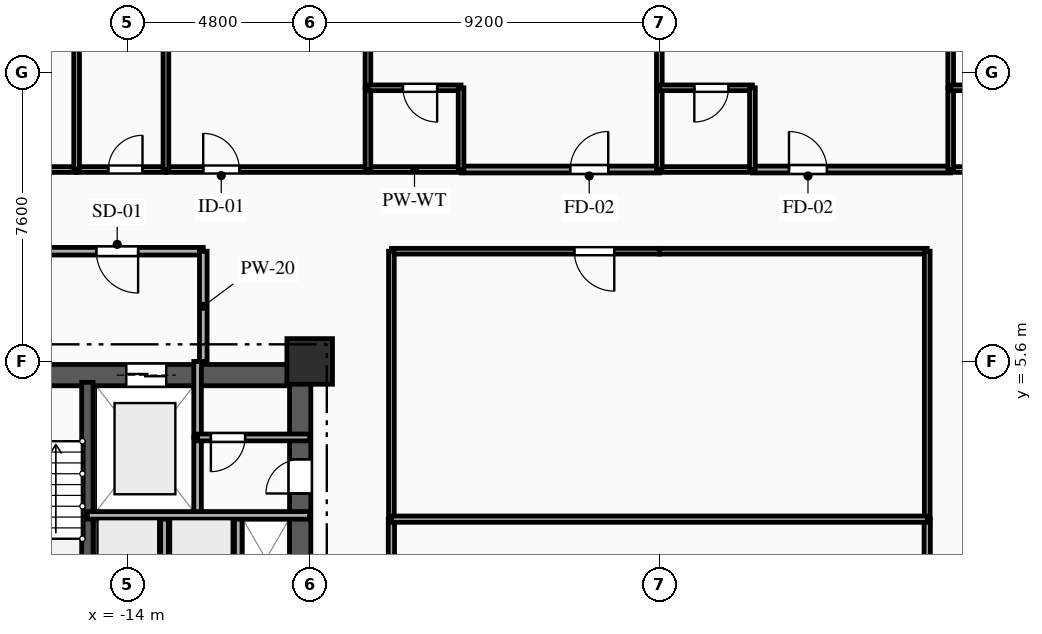
"""IFC4 building model, lengths in metres.
Left out: names, types, materials, properties, quantities, classifications, styles, units other than length and angle.
Written with IfcOpenShell. Run it as: python <this file> out.ifc"""

import sys

from ifc_helpers import new_model, si_unit, direction, frame, frame_2d, origin, origin_2d, place, context, subcontext, project, spatial, rectangle, extrude, element, fill, save


model = new_model("IFC4")
c1 = context("Model", 3, precision=1e-05, world=origin(), true_north=direction((0.0, 1.0)))
c2 = subcontext(c1, "Body", "Model", "MODEL_VIEW")
j1 = project(units=[si_unit("LENGTHUNIT", "METRE"), si_unit("PLANEANGLEUNIT", "RADIAN")], contexts=[c1])
p1 = place(None, origin())
s1 = spatial("IfcSite", under=j1, at=p1, CompositionType="ELEMENT")
p2 = place(p1, origin())
s2 = spatial("IfcBuilding", under=s1, at=p2, CompositionType="ELEMENT")
p3 = place(p2, frame((0.0, 0.0, 43.75)))
s3 = spatial("IfcBuildingStorey", under=s2, at=p3, CompositionType="ELEMENT", Elevation=43.75)
p4 = place(p3, frame((-9.2, 5.6, 0.0), z_axis=(0.0, 0.0, 1.0), x_axis=(1.0, 0.0, 0.0)))
e1 = element("IfcColumn", 1, at=p4, inside=s3, PredefinedType="COLUMN", context=c2, shape_type="SweptSolid", body=[
    extrude(rectangle(XDim=1.2, YDim=1.2, at=origin_2d()), origin(), (0.0, 0.0, 1.0), 3.35),
])
p5 = place(p3, frame((-18.8, 5.24, 0.0), z_axis=(0.0, 0.0, 1.0), x_axis=(1.0, 0.0, 0.0)))
e2 = element("IfcWall", 2, at=p5, inside=s3, PredefinedType="SHEAR", context=c2, shape_type="SweptSolid", body=[
    extrude(rectangle(XDim=9.6, YDim=0.56, at=frame_2d((4.8, 0.0))), origin(), (0.0, 0.0, 1.0), 3.035),
])
p6 = place(p5, frame((1.55, 0.0, 0.0)))
e3 = element("IfcOpeningElement", 3, at=p6, cuts=e2, PredefinedType="OPENING", context=c2, shape_type="SweptSolid", body=[
    extrude(rectangle(XDim=1.1, YDim=2.15, at=frame_2d((0.55, 1.075))), frame((0.0, 0.29, 0.0), z_axis=(0.0, -1.0, 0.0), x_axis=(1.0, 0.0, 0.0)), (0.0, 0.0, 1.0), 0.58),
])
p7 = place(p5, frame((4.775, 0.0, 0.0)))
e4 = element("IfcOpeningElement", 4, at=p7, cuts=e2, PredefinedType="OPENING", context=c2, shape_type="SweptSolid", body=[
    extrude(rectangle(XDim=1.05, YDim=2.1, at=frame_2d((0.525, 1.05))), frame((0.0, 0.29, 0.0), z_axis=(0.0, -1.0, 0.0), x_axis=(1.0, 0.0, 0.0)), (0.0, 0.0, 1.0), 0.58),
])
p8 = place(p3, frame((-9.45, -5.05, 0.0), z_axis=(0.0, 0.0, 1.0), x_axis=(0.0, 1.0, 0.0)))
e5 = element("IfcWall", 5, at=p8, inside=s3, PredefinedType="SHEAR", context=c2, shape_type="SweptSolid", body=[
    extrude(rectangle(XDim=10.1, YDim=0.56, at=frame_2d((5.05, 0.0))), origin(), (0.0, 0.0, 1.0), 3.035),
])
p9 = place(p8, frame((7.175, 0.0, 0.0)))
e6 = element("IfcOpeningElement", 6, at=p9, cuts=e5, PredefinedType="OPENING", context=c2, shape_type="SweptSolid", body=[
    extrude(rectangle(XDim=0.9, YDim=2.1, at=frame_2d((0.45, 1.05))), frame((0.0, 0.29, 0.0), z_axis=(0.0, -1.0, 0.0), x_axis=(1.0, 0.0, 0.0)), (0.0, 0.0, 1.0), 0.58),
])
p10 = place(p8, frame((2.4, 0.0, 0.0)))
e7 = element("IfcOpeningElement", 7, at=p10, cuts=e5, PredefinedType="OPENING", context=c2, shape_type="SweptSolid", body=[
    extrude(rectangle(XDim=1.2, YDim=2.15, at=frame_2d((0.6, 1.075))), frame((0.0, 0.29, 0.0), z_axis=(0.0, -1.0, 0.0), x_axis=(1.0, 0.0, 0.0)), (0.0, 0.0, 1.0), 0.58),
])
p11 = place(p3, frame((-15.05, -5.05, 0.0), z_axis=(0.0, 0.0, 1.0), x_axis=(0.0, 1.0, 0.0)))
e8 = element("IfcWall", 8, at=p11, inside=s3, PredefinedType="SHEAR", context=c2, shape_type="SweptSolid", body=[
    extrude(rectangle(XDim=10.1, YDim=0.3, at=frame_2d((5.05, 0.0))), origin(), (0.0, 0.0, 1.0), 3.035),
])
p12 = place(p3, frame((-12.15, 1.55, 0.0), z_axis=(0.0, 0.0, 1.0), x_axis=(0.0, 1.0, 0.0)))
e9 = element("IfcWall", 9, at=p12, inside=s3, PredefinedType="PARTITIONING", context=c2, shape_type="SweptSolid", body=[
    extrude(rectangle(XDim=2.05, YDim=0.2, at=frame_2d((1.025, 0.0))), origin(), (0.0, 0.0, 1.0), 3.035),
])
p13 = place(p3, frame((-12.15, 3.6, 0.0), z_axis=(0.0, 0.0, 1.0), x_axis=(0.0, 1.0, 0.0)))
e10 = element("IfcWall", 10, at=p13, inside=s3, PredefinedType="PARTITIONING", context=c2, shape_type="SweptSolid", body=[
    extrude(rectangle(XDim=2.0, YDim=0.2, at=frame_2d((1.0, 0.0))), origin(), (0.0, 0.0, 1.0), 3.035),
])
p14 = place(p3, frame((-12.0, 8.5, 0.0), z_axis=(0.0, 0.0, 1.0), x_axis=(-1.0, 0.0, 0.0)))
e11 = element("IfcWall", 11, at=p14, inside=s3, PredefinedType="PARTITIONING", context=c2, shape_type="SweptSolid", body=[
    extrude(rectangle(XDim=6.8, YDim=0.2, at=frame_2d((3.4, 0.0))), origin(), (0.0, 0.0, 1.0), 3.035),
])
p15 = place(p14, frame((1.715, 0.0, 0.0)))
e12 = element("IfcOpeningElement", 12, at=p15, cuts=e11, PredefinedType="OPENING", context=c2, shape_type="SweptSolid", body=[
    extrude(rectangle(XDim=1.1, YDim=2.15, at=frame_2d((0.55, 1.075))), frame((0.0, 0.11, 0.0), z_axis=(0.0, -1.0, 0.0), x_axis=(1.0, 0.0, 0.0)), (0.0, 0.0, 1.0), 0.22),
])
p16 = place(p3, frame((-12.0, 5.6, 0.0), z_axis=(0.0, 0.0, 1.0), x_axis=(0.0, 1.0, 0.0)))
e13 = element("IfcWall", 13, at=p16, inside=s3, PredefinedType="PARTITIONING", context=c2, shape_type="SweptSolid", body=[
    extrude(rectangle(XDim=2.9, YDim=0.2, at=frame_2d((1.45, 0.0))), origin(), (0.0, 0.0, 1.0), 3.035),
])
p17 = place(p3, frame((-9.2, 3.6, 0.0), z_axis=(0.0, 0.0, 1.0), x_axis=(-1.0, 0.0, 0.0)))
e14 = element("IfcWall", 14, at=p17, inside=s3, PredefinedType="PARTITIONING", context=c2, shape_type="SweptSolid", body=[
    extrude(rectangle(XDim=2.95, YDim=0.18, at=frame_2d((1.475, 0.0))), origin(), (0.0, 0.0, 1.0), 3.035),
])
p18 = place(p17, frame((1.7, 0.0, 0.0)))
e15 = element("IfcOpeningElement", 15, at=p18, cuts=e14, PredefinedType="OPENING", context=c2, shape_type="SweptSolid", body=[
    extrude(rectangle(XDim=0.9, YDim=2.1, at=frame_2d((0.45, 1.05))), frame((0.0, 0.1, 0.0), z_axis=(0.0, -1.0, 0.0), x_axis=(1.0, 0.0, 0.0)), (0.0, 0.0, 1.0), 0.2),
])
for number, where, z_axis, x_axis in (
    (16, (-13.02, -0.75, 0.0), (0.0, 0.0, 1.0), (0.0, 1.0, 0.0)),
    (17, (-11.08, -0.75, 0.0), (0.0, 0.0, 1.0), (0.0, 1.0, 0.0)),
):
    element("IfcWall", number, at=place(p3, frame(where, z_axis=z_axis, x_axis=x_axis)), inside=s3, PredefinedType="PARTITIONING", context=c2, shape_type="SweptSolid", body=[
        extrude(rectangle(XDim=2.3, YDim=0.2, at=frame_2d((1.15, 0.0))), origin(), (0.0, 0.0, 1.0), 3.035),
    ])
p19 = place(p3, frame((-23.0, 10.65, 0.0), z_axis=(0.0, 0.0, 1.0), x_axis=(1.0, 0.0, 0.0)))
e18 = element("IfcWall", 18, at=p19, inside=s3, PredefinedType="PARTITIONING", context=c2, shape_type="SweptSolid", body=[
    extrude(rectangle(XDim=7.667, YDim=0.15, at=frame_2d((3.833, 0.0))), origin(), (0.0, 0.0, 1.0), 3.035),
])
p20 = place(p19, frame((1.262, 0.0, 0.0)))
e19 = element("IfcOpeningElement", 19, at=p20, cuts=e18, PredefinedType="OPENING", context=c2, shape_type="SweptSolid", body=[
    extrude(rectangle(XDim=1.05, YDim=2.15, at=frame_2d((0.525, 1.075))), frame((0.0, 0.085, 0.0), z_axis=(0.0, -1.0, 0.0), x_axis=(1.0, 0.0, 0.0)), (0.0, 0.0, 1.0), 0.17),
])
p21 = place(p3, frame((-15.333, 10.65, 0.0), z_axis=(0.0, 0.0, 1.0), x_axis=(1.0, 0.0, 0.0)))
e20 = element("IfcWall", 20, at=p21, inside=s3, PredefinedType="PLUMBINGWALL", context=c2, shape_type="SweptSolid", body=[
    extrude(rectangle(XDim=2.35, YDim=0.15, at=frame_2d((1.175, 0.0))), origin(), (0.0, 0.0, 1.0), 3.035),
])
p22 = place(p21, frame((0.834, 0.0, 0.0)))
e21 = element("IfcOpeningElement", 21, at=p22, cuts=e20, PredefinedType="OPENING", context=c2, shape_type="SweptSolid", body=[
    extrude(rectangle(XDim=0.9, YDim=2.1, at=frame_2d((0.45, 1.05))), frame((0.0, 0.085, 0.0), z_axis=(0.0, -1.0, 0.0), x_axis=(1.0, 0.0, 0.0)), (0.0, 0.0, 1.0), 0.17),
])
p23 = place(p3, frame((-12.983, 10.65, 0.0), z_axis=(0.0, 0.0, 1.0), x_axis=(1.0, 0.0, 0.0)))
e22 = element("IfcWall", 22, at=p23, inside=s3, PredefinedType="PARTITIONING", context=c2, shape_type="SweptSolid", body=[
    extrude(rectangle(XDim=5.316, YDim=0.15, at=frame_2d((2.658, 0.0))), origin(), (0.0, 0.0, 1.0), 3.035),
])
p24 = place(p23, frame((0.981, 0.0, 0.0)))
e23 = element("IfcOpeningElement", 23, at=p24, cuts=e22, PredefinedType="OPENING", context=c2, shape_type="SweptSolid", body=[
    extrude(rectangle(XDim=0.95, YDim=2.1, at=frame_2d((0.475, 1.05))), frame((0.0, 0.085, 0.0), z_axis=(0.0, -1.0, 0.0), x_axis=(1.0, 0.0, 0.0)), (0.0, 0.0, 1.0), 0.17),
])
p25 = place(p3, frame((-5.217, 10.65, 0.0), z_axis=(0.0, 0.0, 1.0), x_axis=(1.0, 0.0, 0.0)))
e24 = element("IfcWall", 24, at=p25, inside=s3, PredefinedType="PARTITIONING", context=c2, shape_type="SweptSolid", body=[
    extrude(rectangle(XDim=5.217, YDim=0.18, at=frame_2d((2.608, 0.0))), origin(), (0.0, 0.0, 1.0), 3.035),
])
p26 = place(p25, frame((2.873, 0.0, 0.0)))
e25 = element("IfcOpeningElement", 25, at=p26, cuts=e24, PredefinedType="OPENING", context=c2, shape_type="SweptSolid", body=[
    extrude(rectangle(XDim=1.0, YDim=2.15, at=frame_2d((0.5, 1.075))), frame((0.0, 0.1, 0.0), z_axis=(0.0, -1.0, 0.0), x_axis=(1.0, 0.0, 0.0)), (0.0, 0.0, 1.0), 0.2),
])
p27 = place(p3, frame((-7.667, 10.65, 0.0), z_axis=(0.0, 0.0, 1.0), x_axis=(1.0, 0.0, 0.0)))
e26 = element("IfcWall", 26, at=p27, inside=s3, PredefinedType="PLUMBINGWALL", context=c2, shape_type="SweptSolid", body=[
    extrude(rectangle(XDim=2.45, YDim=0.15, at=frame_2d((1.225, 0.0))), origin(), (0.0, 0.0, 1.0), 3.035),
])
p28 = place(p3, frame((0.0, 8.5, 0.0), z_axis=(0.0, 0.0, 1.0), x_axis=(-1.0, 0.0, 0.0)))
e27 = element("IfcWall", 27, at=p28, inside=s3, PredefinedType="PARTITIONING", context=c2, shape_type="SweptSolid", body=[
    extrude(rectangle(XDim=7.05, YDim=0.15, at=frame_2d((3.525, 0.0))), origin(), (0.0, 0.0, 1.0), 3.035),
])
p29 = place(p28, frame((1.185, 0.0, 0.0)))
e28 = element("IfcOpeningElement", 28, at=p29, cuts=e27, PredefinedType="OPENING", context=c2, shape_type="SweptSolid", body=[
    extrude(rectangle(XDim=1.05, YDim=2.15, at=frame_2d((0.525, 1.075))), frame((0.0, 0.085, 0.0), z_axis=(0.0, -1.0, 0.0), x_axis=(1.0, 0.0, 0.0)), (0.0, 0.0, 1.0), 0.17),
])
p30 = place(p3, frame((2.45, 10.65, 0.0), z_axis=(0.0, 0.0, 1.0), x_axis=(1.0, 0.0, 0.0)))
e29 = element("IfcWall", 29, at=p30, inside=s3, PredefinedType="PARTITIONING", context=c2, shape_type="SweptSolid", body=[
    extrude(rectangle(XDim=5.217, YDim=0.18, at=frame_2d((2.608, 0.0))), origin(), (0.0, 0.0, 1.0), 3.035),
])
p31 = place(p30, frame((0.962, 0.0, 0.0)))
e30 = element("IfcOpeningElement", 30, at=p31, cuts=e29, PredefinedType="OPENING", context=c2, shape_type="SweptSolid", body=[
    extrude(rectangle(XDim=1.0, YDim=2.15, at=frame_2d((0.5, 1.075))), frame((0.0, 0.1, 0.0), z_axis=(0.0, -1.0, 0.0), x_axis=(1.0, 0.0, 0.0)), (0.0, 0.0, 1.0), 0.2),
])
for number, where, z_axis, x_axis in (
    (31, (0.0, 10.65, 0.0), (0.0, 0.0, 1.0), (1.0, 0.0, 0.0)),
    (32, (7.667, 10.65, 0.0), (0.0, 0.0, 1.0), (1.0, 0.0, 0.0)),
):
    element("IfcWall", number, at=place(p3, frame(where, z_axis=z_axis, x_axis=x_axis)), inside=s3, PredefinedType="PLUMBINGWALL", context=c2, shape_type="SweptSolid", body=[
        extrude(rectangle(XDim=2.45, YDim=0.15, at=frame_2d((1.225, 0.0))), origin(), (0.0, 0.0, 1.0), 3.035),
    ])
p32 = place(p3, frame((7.05, 8.5, 0.0), z_axis=(0.0, 0.0, 1.0), x_axis=(-1.0, 0.0, 0.0)))
e33 = element("IfcWall", 33, at=p32, inside=s3, PredefinedType="PARTITIONING", context=c2, shape_type="SweptSolid", body=[
    extrude(rectangle(XDim=7.05, YDim=0.15, at=frame_2d((3.525, 0.0))), origin(), (0.0, 0.0, 1.0), 3.035),
])
p33 = place(p3, frame((-7.05, 1.45, 0.0), z_axis=(0.0, 0.0, 1.0), x_axis=(0.0, -1.0, 0.0)))
e34 = element("IfcWall", 34, at=p33, inside=s3, PredefinedType="PARTITIONING", context=c2, shape_type="SweptSolid", body=[
    extrude(rectangle(XDim=7.05, YDim=0.165, at=frame_2d((3.525, 0.0))), origin(), (0.0, 0.0, 1.0), 3.035),
])
p34 = place(p3, frame((-7.05, 8.5, 0.0), z_axis=(0.0, 0.0, 1.0), x_axis=(0.0, -1.0, 0.0)))
e35 = element("IfcWall", 35, at=p34, inside=s3, PredefinedType="PARTITIONING", context=c2, shape_type="SweptSolid", body=[
    extrude(rectangle(XDim=7.05, YDim=0.15, at=frame_2d((3.525, 0.0))), origin(), (0.0, 0.0, 1.0), 3.035),
])
p35 = place(p3, frame((7.05, -5.6, 0.0), z_axis=(0.0, 0.0, 1.0), x_axis=(0.0, 1.0, 0.0)))
e36 = element("IfcWall", 36, at=p35, inside=s3, PredefinedType="PARTITIONING", context=c2, shape_type="SweptSolid", body=[
    extrude(rectangle(XDim=7.05, YDim=0.165, at=frame_2d((3.525, 0.0))), origin(), (0.0, 0.0, 1.0), 3.035),
])
p36 = place(p3, frame((7.05, 1.45, 0.0), z_axis=(0.0, 0.0, 1.0), x_axis=(0.0, 1.0, 0.0)))
e37 = element("IfcWall", 37, at=p36, inside=s3, PredefinedType="PARTITIONING", context=c2, shape_type="SweptSolid", body=[
    extrude(rectangle(XDim=7.05, YDim=0.15, at=frame_2d((3.525, 0.0))), origin(), (0.0, 0.0, 1.0), 3.035),
])
for number, where, z_axis, x_axis in (
    (38, (-15.333, 19.4, 0.0), (0.0, 0.0, 1.0), (0.0, -1.0, 0.0)),
    (39, (-12.983, 19.4, 0.0), (0.0, 0.0, 1.0), (0.0, -1.0, 0.0)),
):
    element("IfcWall", number, at=place(p3, frame(where, z_axis=z_axis, x_axis=x_axis)), inside=s3, PredefinedType="PLUMBINGWALL", context=c2, shape_type="SweptSolid", body=[
        extrude(rectangle(XDim=8.75, YDim=0.15, at=frame_2d((4.375, 0.0))), origin(), (0.0, 0.0, 1.0), 3.035),
    ])
p37 = place(p3, frame((-7.667, 19.4, 0.0), z_axis=(0.0, 0.0, 1.0), x_axis=(0.0, -1.0, 0.0)))
e40 = element("IfcWall", 40, at=p37, inside=s3, PredefinedType="PARTITIONING", context=c2, shape_type="SweptSolid", body=[
    extrude(rectangle(XDim=6.6, YDim=0.15, at=frame_2d((3.3, 0.0))), origin(), (0.0, 0.0, 1.0), 3.035),
])
p38 = place(p3, frame((-7.667, 12.8, 0.0), z_axis=(0.0, 0.0, 1.0), x_axis=(0.0, -1.0, 0.0)))
e41 = element("IfcWall", 41, at=p38, inside=s3, PredefinedType="PLUMBINGWALL", context=c2, shape_type="SweptSolid", body=[
    extrude(rectangle(XDim=2.15, YDim=0.15, at=frame_2d((1.075, 0.0))), origin(), (0.0, 0.0, 1.0), 3.035),
])
p39 = place(p3, frame((-5.217, 12.8, 0.0), z_axis=(0.0, 0.0, 1.0), x_axis=(-1.0, 0.0, 0.0)))
e42 = element("IfcWall", 42, at=p39, inside=s3, PredefinedType="PLUMBINGWALL", context=c2, shape_type="SweptSolid", body=[
    extrude(rectangle(XDim=2.45, YDim=0.15, at=frame_2d((1.225, 0.0))), origin(), (0.0, 0.0, 1.0), 3.035),
])
p40 = place(p39, frame((0.629, 0.0, 0.0)))
e43 = element("IfcOpeningElement", 43, at=p40, cuts=e42, PredefinedType="OPENING", context=c2, shape_type="SweptSolid", body=[
    extrude(rectangle(XDim=0.9, YDim=2.1, at=frame_2d((0.45, 1.05))), frame((0.0, 0.085, 0.0), z_axis=(0.0, -1.0, 0.0), x_axis=(1.0, 0.0, 0.0)), (0.0, 0.0, 1.0), 0.17),
])
p41 = place(p3, frame((-5.217, 10.65, 0.0), z_axis=(0.0, 0.0, 1.0), x_axis=(0.0, 1.0, 0.0)))
e44 = element("IfcWall", 44, at=p41, inside=s3, PredefinedType="PLUMBINGWALL", context=c2, shape_type="SweptSolid", body=[
    extrude(rectangle(XDim=2.15, YDim=0.15, at=frame_2d((1.075, 0.0))), origin(), (0.0, 0.0, 1.0), 3.035),
])
p42 = place(p3, frame((0.0, 19.4, 0.0), z_axis=(0.0, 0.0, 1.0), x_axis=(0.0, -1.0, 0.0)))
e45 = element("IfcWall", 45, at=p42, inside=s3, PredefinedType="PARTITIONING", context=c2, shape_type="SweptSolid", body=[
    extrude(rectangle(XDim=6.6, YDim=0.15, at=frame_2d((3.3, 0.0))), origin(), (0.0, 0.0, 1.0), 3.035),
])
p43 = place(p3, frame((0.0, 12.8, 0.0), z_axis=(0.0, 0.0, 1.0), x_axis=(0.0, -1.0, 0.0)))
e46 = element("IfcWall", 46, at=p43, inside=s3, PredefinedType="PLUMBINGWALL", context=c2, shape_type="SweptSolid", body=[
    extrude(rectangle(XDim=2.15, YDim=0.15, at=frame_2d((1.075, 0.0))), origin(), (0.0, 0.0, 1.0), 3.035),
])
p44 = place(p3, frame((2.45, 12.8, 0.0), z_axis=(0.0, 0.0, 1.0), x_axis=(-1.0, 0.0, 0.0)))
e47 = element("IfcWall", 47, at=p44, inside=s3, PredefinedType="PLUMBINGWALL", context=c2, shape_type="SweptSolid", body=[
    extrude(rectangle(XDim=2.45, YDim=0.15, at=frame_2d((1.225, 0.0))), origin(), (0.0, 0.0, 1.0), 3.035),
])
p45 = place(p44, frame((0.629, 0.0, 0.0)))
e48 = element("IfcOpeningElement", 48, at=p45, cuts=e47, PredefinedType="OPENING", context=c2, shape_type="SweptSolid", body=[
    extrude(rectangle(XDim=0.9, YDim=2.1, at=frame_2d((0.45, 1.05))), frame((0.0, 0.085, 0.0), z_axis=(0.0, -1.0, 0.0), x_axis=(1.0, 0.0, 0.0)), (0.0, 0.0, 1.0), 0.17),
])
p46 = place(p3, frame((2.45, 10.65, 0.0), z_axis=(0.0, 0.0, 1.0), x_axis=(0.0, 1.0, 0.0)))
e49 = element("IfcWall", 49, at=p46, inside=s3, PredefinedType="PLUMBINGWALL", context=c2, shape_type="SweptSolid", body=[
    extrude(rectangle(XDim=2.15, YDim=0.15, at=frame_2d((1.075, 0.0))), origin(), (0.0, 0.0, 1.0), 3.035),
])
p47 = place(p3, frame((7.667, 19.4, 0.0), z_axis=(0.0, 0.0, 1.0), x_axis=(0.0, -1.0, 0.0)))
e50 = element("IfcWall", 50, at=p47, inside=s3, PredefinedType="PARTITIONING", context=c2, shape_type="SweptSolid", body=[
    extrude(rectangle(XDim=6.6, YDim=0.15, at=frame_2d((3.3, 0.0))), origin(), (0.0, 0.0, 1.0), 3.035),
])
p48 = place(p3, frame((7.667, 12.8, 0.0), z_axis=(0.0, 0.0, 1.0), x_axis=(0.0, -1.0, 0.0)))
e51 = element("IfcWall", 51, at=p48, inside=s3, PredefinedType="PLUMBINGWALL", context=c2, shape_type="SweptSolid", body=[
    extrude(rectangle(XDim=2.15, YDim=0.15, at=frame_2d((1.075, 0.0))), origin(), (0.0, 0.0, 1.0), 3.035),
])
p49 = place(p3, frame((10.117, 12.8, 0.0), z_axis=(0.0, 0.0, 1.0), x_axis=(-1.0, 0.0, 0.0)))
e52 = element("IfcWall", 52, at=p49, inside=s3, PredefinedType="PLUMBINGWALL", context=c2, shape_type="SweptSolid", body=[
    extrude(rectangle(XDim=2.45, YDim=0.15, at=frame_2d((1.225, 0.0))), origin(), (0.0, 0.0, 1.0), 3.035),
])
p50 = place(p49, frame((0.921, 0.0, 0.0)))
e53 = element("IfcOpeningElement", 53, at=p50, cuts=e52, PredefinedType="OPENING", context=c2, shape_type="SweptSolid", body=[
    extrude(rectangle(XDim=0.9, YDim=2.1, at=frame_2d((0.45, 1.05))), frame((0.0, 0.085, 0.0), z_axis=(0.0, -1.0, 0.0), x_axis=(1.0, 0.0, 0.0)), (0.0, 0.0, 1.0), 0.17),
])
p51 = place(p3, frame((-7.05, 1.45, 0.0), z_axis=(0.0, 0.0, 1.0), x_axis=(1.0, 0.0, 0.0)))
e54 = element("IfcWall", 54, at=p51, inside=s3, PredefinedType="PARTITIONING", context=c2, shape_type="SweptSolid", body=[
    extrude(rectangle(XDim=14.1, YDim=0.165, at=frame_2d((7.05, 0.0))), origin(), (0.0, 0.0, 1.0), 3.035),
])
p52 = place(p3, frame((-15.05, 1.55, 0.0), z_axis=(0.0, 0.0, 1.0), x_axis=(1.0, 0.0, 0.0)))
e55 = element("IfcWall", 55, at=p52, inside=s3, PredefinedType="PARTITIONING", context=c2, shape_type="SweptSolid", body=[
    extrude(rectangle(XDim=5.85, YDim=0.2, at=frame_2d((2.925, 0.0))), origin(), (0.0, 0.0, 1.0), 3.035),
])
p53 = place(p7, origin())
e56 = element("IfcDoor", 56, at=p53, inside=s3, OperationType="DOUBLE_DOOR_SLIDING", PredefinedType="DOOR", context=c2, shape_type="SweptSolid", body=[
    extrude(rectangle(XDim=1.05, YDim=2.1, at=frame_2d((0.525, 1.05))), frame((0.0, 0.025, 0.0), z_axis=(0.0, -1.0, 0.0), x_axis=(1.0, 0.0, 0.0)), (0.0, 0.0, 1.0), 0.05),
])
fill(e4, e56)
p54 = place(p15, origin())
e57 = element("IfcDoor", 57, at=p54, inside=s3, OperationType="SINGLE_SWING_LEFT", PredefinedType="DOOR", context=c2, shape_type="SweptSolid", body=[
    extrude(rectangle(XDim=1.1, YDim=2.15, at=frame_2d((0.55, 1.075))), frame((0.0, 0.025, 0.0), z_axis=(0.0, -1.0, 0.0), x_axis=(1.0, 0.0, 0.0)), (0.0, 0.0, 1.0), 0.05),
])
fill(e12, e57)
p55 = place(p18, origin())
e58 = element("IfcDoor", 58, at=p55, inside=s3, OperationType="SINGLE_SWING_RIGHT", PredefinedType="DOOR", context=c2, shape_type="SweptSolid", body=[
    extrude(rectangle(XDim=0.9, YDim=2.1, at=frame_2d((0.45, 1.05))), frame((0.0, 0.025, 0.0), z_axis=(0.0, -1.0, 0.0), x_axis=(1.0, 0.0, 0.0)), (0.0, 0.0, 1.0), 0.05),
])
fill(e15, e58)
p56 = place(p9, origin())
e59 = element("IfcDoor", 59, at=p56, inside=s3, OperationType="SINGLE_SWING_LEFT", PredefinedType="DOOR", context=c2, shape_type="SweptSolid", body=[
    extrude(rectangle(XDim=0.9, YDim=2.1, at=frame_2d((0.45, 1.05))), frame((0.0, 0.025, 0.0), z_axis=(0.0, -1.0, 0.0), x_axis=(1.0, 0.0, 0.0)), (0.0, 0.0, 1.0), 0.05),
])
fill(e6, e59)
p57 = place(p22, origin())
e60 = element("IfcDoor", 60, at=p57, inside=s3, OperationType="SINGLE_SWING_RIGHT", PredefinedType="DOOR", context=c2, shape_type="SweptSolid", body=[
    extrude(rectangle(XDim=0.9, YDim=2.1, at=frame_2d((0.45, 1.05))), frame((0.0, 0.025, 0.0), z_axis=(0.0, -1.0, 0.0), x_axis=(1.0, 0.0, 0.0)), (0.0, 0.0, 1.0), 0.05),
])
fill(e21, e60)
p58 = place(p24, origin())
e61 = element("IfcDoor", 61, at=p58, inside=s3, OperationType="SINGLE_SWING_LEFT", PredefinedType="DOOR", context=c2, shape_type="SweptSolid", body=[
    extrude(rectangle(XDim=0.95, YDim=2.1, at=frame_2d((0.475, 1.05))), frame((0.0, 0.025, 0.0), z_axis=(0.0, -1.0, 0.0), x_axis=(1.0, 0.0, 0.0)), (0.0, 0.0, 1.0), 0.05),
])
fill(e23, e61)
p59 = place(p26, origin())
e62 = element("IfcDoor", 62, at=p59, inside=s3, OperationType="SINGLE_SWING_RIGHT", PredefinedType="DOOR", context=c2, shape_type="SweptSolid", body=[
    extrude(rectangle(XDim=1.0, YDim=2.15, at=frame_2d((0.5, 1.075))), frame((0.0, 0.025, 0.0), z_axis=(0.0, -1.0, 0.0), x_axis=(1.0, 0.0, 0.0)), (0.0, 0.0, 1.0), 0.05),
])
fill(e25, e62)
p60 = place(p29, origin())
e63 = element("IfcDoor", 63, at=p60, inside=s3, OperationType="SINGLE_SWING_LEFT", PredefinedType="DOOR", context=c2, shape_type="SweptSolid", body=[
    extrude(rectangle(XDim=1.05, YDim=2.15, at=frame_2d((0.525, 1.075))), frame((0.0, 0.025, 0.0), z_axis=(0.0, -1.0, 0.0), x_axis=(1.0, 0.0, 0.0)), (0.0, 0.0, 1.0), 0.05),
])
fill(e28, e63)
p61 = place(p31, origin())
e64 = element("IfcDoor", 64, at=p61, inside=s3, OperationType="SINGLE_SWING_LEFT", PredefinedType="DOOR", context=c2, shape_type="SweptSolid", body=[
    extrude(rectangle(XDim=1.0, YDim=2.15, at=frame_2d((0.5, 1.075))), frame((0.0, 0.025, 0.0), z_axis=(0.0, -1.0, 0.0), x_axis=(1.0, 0.0, 0.0)), (0.0, 0.0, 1.0), 0.05),
])
fill(e30, e64)
p62 = place(p40, origin())
e65 = element("IfcDoor", 65, at=p62, inside=s3, OperationType="SINGLE_SWING_LEFT", PredefinedType="DOOR", context=c2, shape_type="SweptSolid", body=[
    extrude(rectangle(XDim=0.9, YDim=2.1, at=frame_2d((0.45, 1.05))), frame((0.0, 0.025, 0.0), z_axis=(0.0, -1.0, 0.0), x_axis=(1.0, 0.0, 0.0)), (0.0, 0.0, 1.0), 0.05),
])
fill(e43, e65)
p63 = place(p45, origin())
e66 = element("IfcDoor", 66, at=p63, inside=s3, OperationType="SINGLE_SWING_RIGHT", PredefinedType="DOOR", context=c2, shape_type="SweptSolid", body=[
    extrude(rectangle(XDim=0.9, YDim=2.1, at=frame_2d((0.45, 1.05))), frame((0.0, 0.025, 0.0), z_axis=(0.0, -1.0, 0.0), x_axis=(1.0, 0.0, 0.0)), (0.0, 0.0, 1.0), 0.05),
])
fill(e48, e66)
save(model, sys.argv[1])
